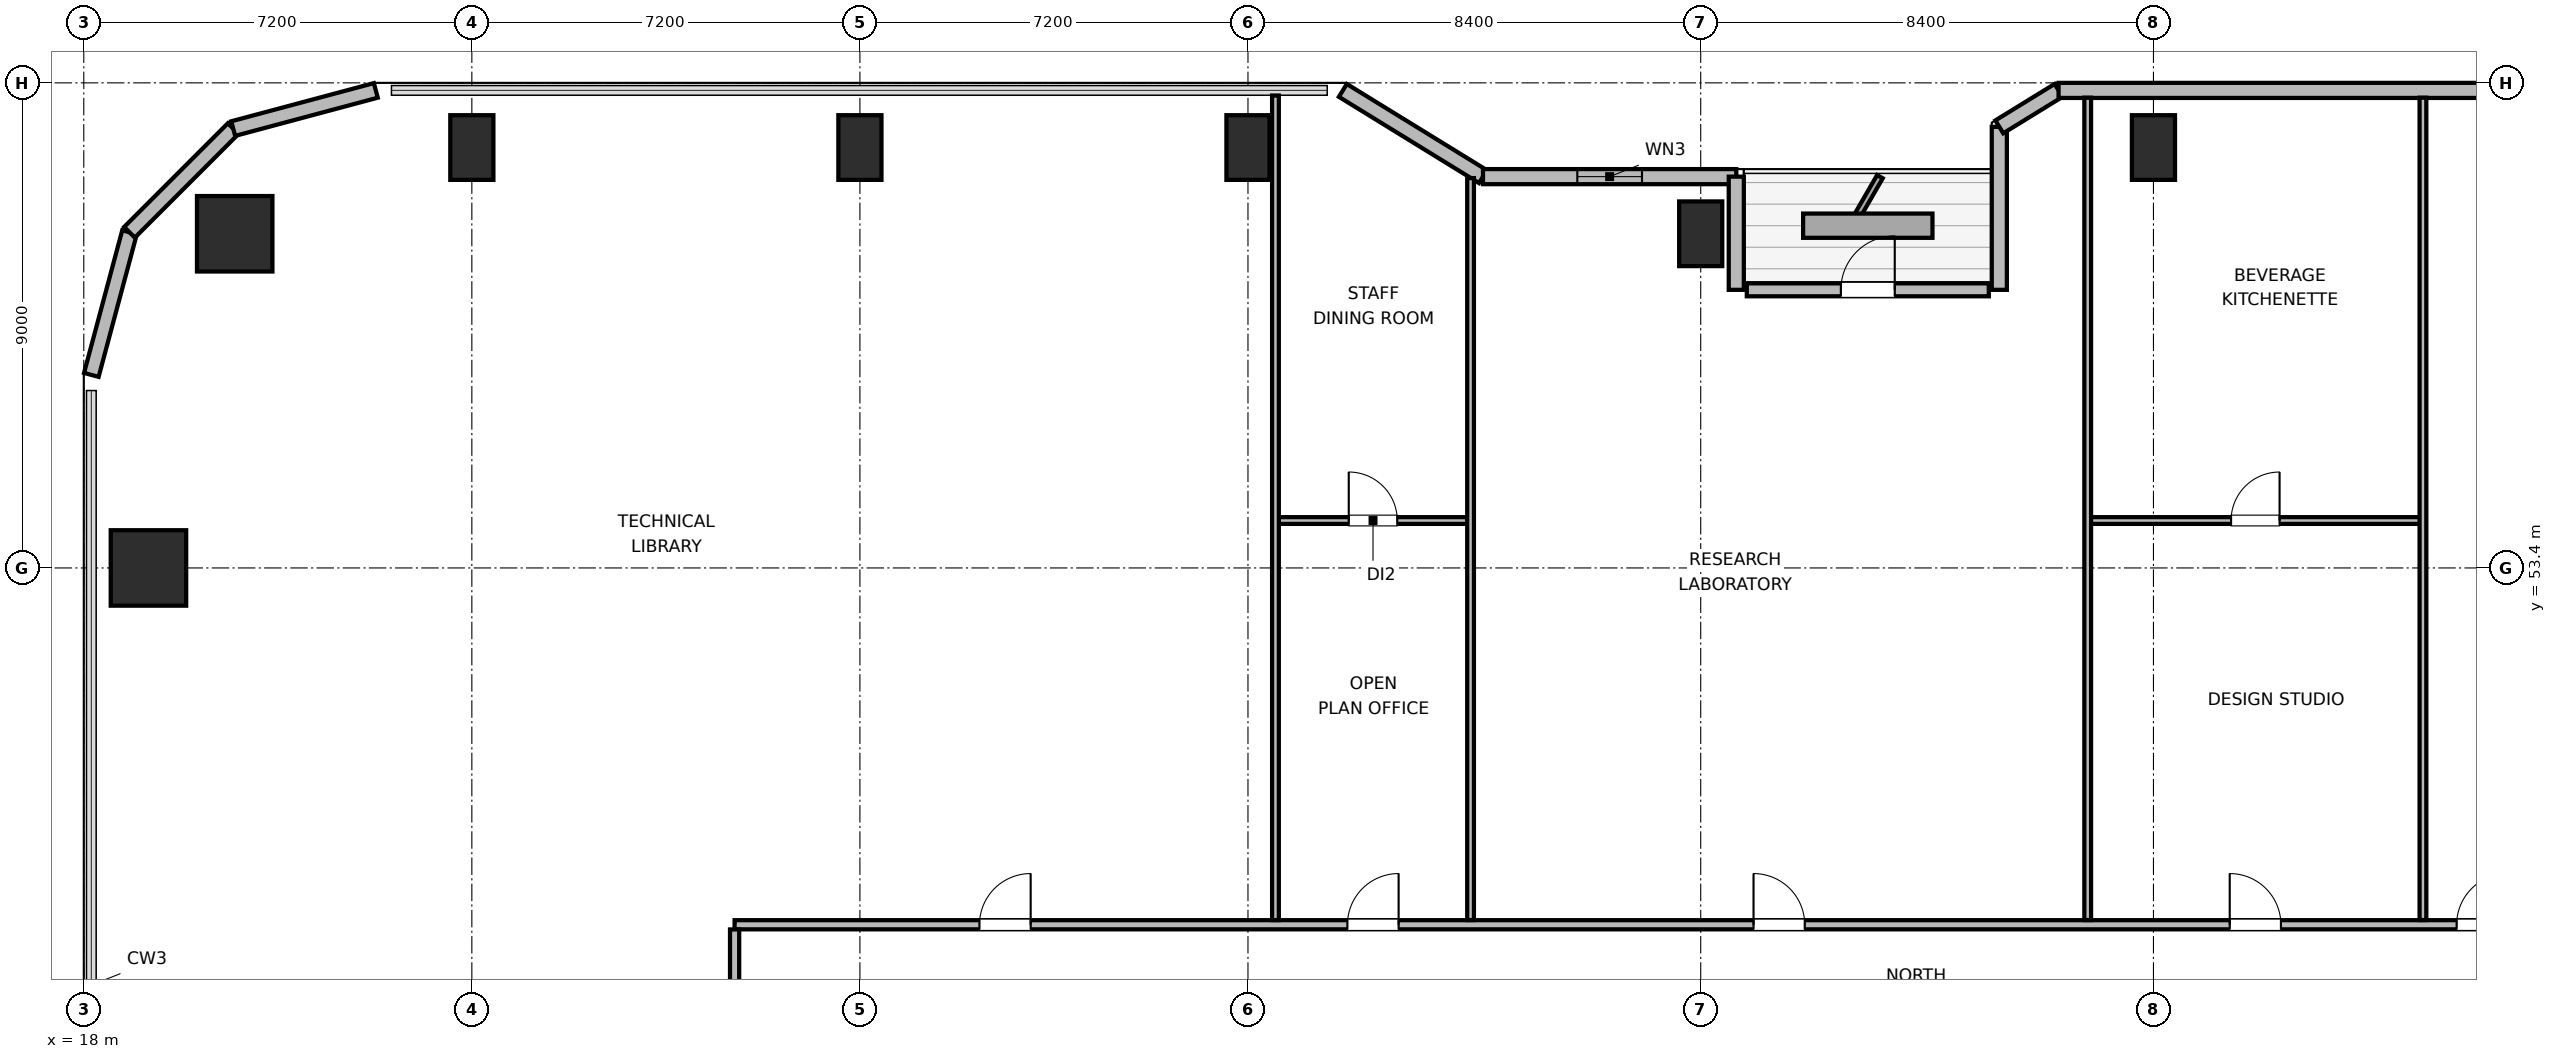
"""IFC4 building model, lengths in metres.
Left out: names, types, materials, properties, quantities, classifications, styles, units other than length and angle.
Written with IfcOpenShell. Run it as: python <this file> out.ifc"""

import sys

from ifc_helpers import new_model, si_unit, direction, frame, frame_2d, origin, origin_2d, place, context, subcontext, project, spatial, rectangle, circle, extrude, element, fill, save


model = new_model("IFC4")
c1 = context("Model", 3, precision=1e-05, world=origin(), true_north=direction((0.0, 1.0)))
c2 = subcontext(c1, "Body", "Model", "MODEL_VIEW")
j1 = project(units=[si_unit("LENGTHUNIT", "METRE"), si_unit("PLANEANGLEUNIT", "RADIAN")], contexts=[c1])
p1 = place(None, origin())
s1 = spatial("IfcSite", under=j1, at=p1, CompositionType="ELEMENT")
p2 = place(p1, origin())
s2 = spatial("IfcBuilding", under=s1, at=p2, CompositionType="ELEMENT")
p3 = place(p2, frame((0.0, 0.0, 158.4)))
s3 = spatial("IfcBuildingStorey", under=s2, at=p3, CompositionType="ELEMENT", Elevation=158.4)
p4 = place(p3, frame((20.8, 59.6, 0.0), z_axis=(0.0, 0.0, 1.0), x_axis=(1.0, 0.0, 0.0)))
e1 = element("IfcColumn", 1, at=p4, inside=s3, PredefinedType="COLUMN", context=c2, shape_type="SweptSolid", body=[
    extrude(circle(Radius=0.7, at=origin_2d()), origin(), (0.0, 0.0, 1.0), 3.9),
])
for number, where, z_axis, x_axis in (
    (2, (25.2, 61.2, 0.0), (0.0, 0.0, 1.0), (1.0, 0.0, 0.0)),
    (3, (32.4, 61.2, 0.0), (0.0, 0.0, 1.0), (1.0, 0.0, 0.0)),
    (4, (39.6, 61.2, 0.0), (0.0, 0.0, 1.0), (1.0, 0.0, 0.0)),
    (5, (48.0, 59.6, 0.0), (0.0, 0.0, 1.0), (1.0, 0.0, 0.0)),
    (6, (56.4, 61.2, 0.0), (0.0, 0.0, 1.0), (1.0, 0.0, 0.0)),
):
    element("IfcColumn", number, at=place(p3, frame(where, z_axis=z_axis, x_axis=x_axis)), inside=s3, PredefinedType="COLUMN", context=c2, shape_type="SweptSolid", body=[
        extrude(rectangle(XDim=0.8, YDim=1.2, at=origin_2d()), origin(), (0.0, 0.0, 1.0), 3.9),
    ])
p5 = place(p3, frame((19.2, 53.4, 0.0), z_axis=(0.0, 0.0, 1.0), x_axis=(1.0, 0.0, 0.0)))
e7 = element("IfcColumn", 7, at=p5, inside=s3, PredefinedType="COLUMN", context=c2, shape_type="SweptSolid", body=[
    extrude(rectangle(XDim=1.4, YDim=1.4, at=origin_2d()), origin(), (0.0, 0.0, 1.0), 3.9),
])
p6 = place(p3, frame((18.14, 56.982, 0.0), z_axis=(0.0, 0.0, 1.0), x_axis=(0.258672222976, 0.9659651552, 0.0)))
e8 = element("IfcWall", 8, at=p6, inside=s3, PredefinedType="SOLIDWALL", context=c2, shape_type="SweptSolid", body=[
    extrude(rectangle(XDim=2.739, YDim=0.28, at=frame_2d((1.37, 0.0))), origin(), (0.0, 0.0, 1.0), 3.68),
])
p7 = place(p3, frame((18.848, 59.627, 0.0), z_axis=(0.0, 0.0, 1.0), x_axis=(0.707106781187, 0.707106781187, 0.0)))
e9 = element("IfcWall", 9, at=p7, inside=s3, PredefinedType="SOLIDWALL", context=c2, shape_type="SweptSolid", body=[
    extrude(rectangle(XDim=2.721, YDim=0.28, at=frame_2d((1.36, 0.0))), origin(), (0.0, 0.0, 1.0), 3.68),
])
p8 = place(p3, frame((20.772, 61.552, 0.0), z_axis=(0.0, 0.0, 1.0), x_axis=(0.965971118627, 0.258649952598, 0.0)))
e10 = element("IfcWall", 10, at=p8, inside=s3, PredefinedType="SOLIDWALL", context=c2, shape_type="SweptSolid", body=[
    extrude(rectangle(XDim=2.739, YDim=0.28, at=frame_2d((1.37, 0.0))), origin(), (0.0, 0.0, 1.0), 3.68),
])
p9 = place(p3, frame((41.36, 62.26, 0.0), z_axis=(0.0, 0.0, 1.0), x_axis=(0.851652825334, -0.524106349037, 0.0)))
e11 = element("IfcWall", 11, at=p9, inside=s3, PredefinedType="SOLIDWALL", context=c2, shape_type="SweptSolid", body=[
    extrude(rectangle(XDim=3.053, YDim=0.28, at=frame_2d((1.526, 0.0))), origin(), (0.0, 0.0, 1.0), 2.265),
])
p10 = place(p3, frame((43.96, 60.66, 0.0), z_axis=(0.0, 0.0, 1.0), x_axis=(1.0, 0.0, 0.0)))
e12 = element("IfcWall", 12, at=p10, inside=s3, PredefinedType="SOLIDWALL", context=c2, shape_type="SweptSolid", body=[
    extrude(rectangle(XDim=4.699, YDim=0.28, at=frame_2d((2.35, 0.0))), origin(), (0.0, 0.0, 1.0), 2.265),
])
p11 = place(p10, frame((1.75, 0.0, 0.85)))
e13 = element("IfcOpeningElement", 13, at=p11, cuts=e12, PredefinedType="OPENING", context=c2, shape_type="SweptSolid", body=[
    extrude(rectangle(XDim=1.2, YDim=1.1, at=frame_2d((0.6, 0.55))), frame((0.0, 0.15, 0.0), z_axis=(0.0, -1.0, 0.0), x_axis=(1.0, 0.0, 0.0)), (0.0, 0.0, 1.0), 0.3),
])
p12 = place(p3, frame((48.66, 60.66, 0.0), z_axis=(0.0, 0.0, 1.0), x_axis=(0.0, -1.0, 0.0)))
e14 = element("IfcWall", 14, at=p12, inside=s3, PredefinedType="SOLIDWALL", context=c2, shape_type="SweptSolid", body=[
    extrude(rectangle(XDim=2.1, YDim=0.28, at=frame_2d((1.05, 0.0))), origin(), (0.0, 0.0, 1.0), 2.265),
])
p13 = place(p3, frame((48.855, 58.56, 0.0), z_axis=(0.0, 0.0, 1.0), x_axis=(1.0, 0.0, 0.0)))
e15 = element("IfcWall", 15, at=p13, inside=s3, PredefinedType="SOLIDWALL", context=c2, shape_type="SweptSolid", body=[
    extrude(rectangle(XDim=4.49, YDim=0.24, at=frame_2d((2.245, 0.0))), origin(), (0.0, 0.0, 1.0), 3.68),
])
p14 = place(p13, frame((1.745, 0.0, 0.0)))
e16 = element("IfcOpeningElement", 16, at=p14, cuts=e15, PredefinedType="OPENING", context=c2, shape_type="SweptSolid", body=[
    extrude(rectangle(XDim=1.0, YDim=2.02, at=frame_2d((0.5, 1.01))), frame((0.0, 0.13, 0.0), z_axis=(0.0, -1.0, 0.0), x_axis=(1.0, 0.0, 0.0)), (0.0, 0.0, 1.0), 0.26),
])
p15 = place(p3, frame((53.54, 58.56, 0.0), z_axis=(0.0, 0.0, 1.0), x_axis=(0.0, 1.0, 0.0)))
e17 = element("IfcWall", 17, at=p15, inside=s3, PredefinedType="SOLIDWALL", context=c2, shape_type="SweptSolid", body=[
    extrude(rectangle(XDim=3.024, YDim=0.28, at=frame_2d((1.512, 0.0))), origin(), (0.0, 0.0, 1.0), 2.265),
])
p16 = place(p3, frame((53.54, 61.584, 0.0), z_axis=(0.0, 0.0, 1.0), x_axis=(0.851801140441, 0.523865266212, 0.0)))
e18 = element("IfcWall", 18, at=p16, inside=s3, PredefinedType="SOLIDWALL", context=c2, shape_type="SweptSolid", body=[
    extrude(rectangle(XDim=1.291, YDim=0.28, at=frame_2d((0.646, 0.0))), origin(), (0.0, 0.0, 1.0), 3.68),
])
p17 = place(p3, frame((54.64, 62.26, 0.0), z_axis=(0.0, 0.0, 1.0), x_axis=(1.0, 0.0, 0.0)))
e19 = element("IfcWall", 19, at=p17, inside=s3, PredefinedType="SOLIDWALL", context=c2, shape_type="SweptSolid", body=[
    extrude(rectangle(XDim=10.742, YDim=0.28, at=frame_2d((5.371, 0.0))), origin(), (0.0, 0.0, 1.0), 3.68),
])
p18 = place(p3, frame((30.075, 46.78, 0.0), z_axis=(0.0, 0.0, 1.0), x_axis=(1.0, 0.0, 0.0)))
e20 = element("IfcWall", 20, at=p18, inside=s3, PredefinedType="PARTITIONING", context=c2, shape_type="SweptSolid", body=[
    extrude(rectangle(XDim=33.525, YDim=0.17, at=frame_2d((16.763, 0.0))), origin(), (0.0, 0.0, 1.0), 3.68),
])
p19 = place(p18, frame((4.543, 0.0, 0.0)))
e21 = element("IfcOpeningElement", 21, at=p19, cuts=e20, PredefinedType="OPENING", context=c2, shape_type="SweptSolid", body=[
    extrude(rectangle(XDim=0.95, YDim=2.04, at=frame_2d((0.475, 1.02))), frame((0.0, 0.095, 0.0), z_axis=(0.0, -1.0, 0.0), x_axis=(1.0, 0.0, 0.0)), (0.0, 0.0, 1.0), 0.19),
])
p20 = place(p18, frame((11.37, 0.0, 0.0)))
e22 = element("IfcOpeningElement", 22, at=p20, cuts=e20, PredefinedType="OPENING", context=c2, shape_type="SweptSolid", body=[
    extrude(rectangle(XDim=0.95, YDim=2.04, at=frame_2d((0.475, 1.02))), frame((0.0, 0.095, 0.0), z_axis=(0.0, -1.0, 0.0), x_axis=(1.0, 0.0, 0.0)), (0.0, 0.0, 1.0), 0.19),
])
p21 = place(p18, frame((18.905, 0.0, 0.0)))
e23 = element("IfcOpeningElement", 23, at=p21, cuts=e20, PredefinedType="OPENING", context=c2, shape_type="SweptSolid", body=[
    extrude(rectangle(XDim=0.95, YDim=2.04, at=frame_2d((0.475, 1.02))), frame((0.0, 0.095, 0.0), z_axis=(0.0, -1.0, 0.0), x_axis=(1.0, 0.0, 0.0)), (0.0, 0.0, 1.0), 0.19),
])
p22 = place(p18, frame((27.74, 0.0, 0.0)))
e24 = element("IfcOpeningElement", 24, at=p22, cuts=e20, PredefinedType="OPENING", context=c2, shape_type="SweptSolid", body=[
    extrude(rectangle(XDim=0.95, YDim=2.04, at=frame_2d((0.475, 1.02))), frame((0.0, 0.095, 0.0), z_axis=(0.0, -1.0, 0.0), x_axis=(1.0, 0.0, 0.0)), (0.0, 0.0, 1.0), 0.19),
])
p23 = place(p18, frame((31.95, 0.0, 0.0)))
e25 = element("IfcOpeningElement", 25, at=p23, cuts=e20, PredefinedType="OPENING", context=c2, shape_type="SweptSolid", body=[
    extrude(rectangle(XDim=0.95, YDim=2.04, at=frame_2d((0.475, 1.02))), frame((0.0, 0.095, 0.0), z_axis=(0.0, -1.0, 0.0), x_axis=(1.0, 0.0, 0.0)), (0.0, 0.0, 1.0), 0.19),
])
p24 = place(p3, frame((30.075, 37.1, 0.0), z_axis=(0.0, 0.0, 1.0), x_axis=(0.0, 1.0, 0.0)))
e26 = element("IfcWall", 26, at=p24, inside=s3, PredefinedType="PARTITIONING", context=c2, shape_type="SweptSolid", body=[
    extrude(rectangle(XDim=9.593, YDim=0.17, at=frame_2d((4.796, 0.0))), origin(), (0.0, 0.0, 1.0), 3.68),
])
p25 = place(p24, frame((4.365, 0.0, 0.0)))
e27 = element("IfcOpeningElement", 27, at=p25, cuts=e26, PredefinedType="OPENING", context=c2, shape_type="SweptSolid", body=[
    extrude(rectangle(XDim=0.95, YDim=2.04, at=frame_2d((0.475, 1.02))), frame((0.0, 0.095, 0.0), z_axis=(0.0, -1.0, 0.0), x_axis=(1.0, 0.0, 0.0)), (0.0, 0.0, 1.0), 0.19),
])
p26 = place(p3, frame((40.11, 54.28, 0.0), z_axis=(0.0, 0.0, 1.0), x_axis=(1.0, 0.0, 0.0)))
e28 = element("IfcWall", 28, at=p26, inside=s3, PredefinedType="PARTITIONING", context=c2, shape_type="SweptSolid", body=[
    extrude(rectangle(XDim=3.62, YDim=0.125, at=frame_2d((1.81, 0.0))), origin(), (0.0, 0.0, 1.0), 3.68),
])
p27 = place(p26, frame((1.36, 0.0, 0.0)))
e29 = element("IfcOpeningElement", 29, at=p27, cuts=e28, PredefinedType="OPENING", context=c2, shape_type="SweptSolid", body=[
    extrude(rectangle(XDim=0.9, YDim=2.02, at=frame_2d((0.45, 1.01))), frame((0.0, 0.073, 0.0), z_axis=(0.0, -1.0, 0.0), x_axis=(1.0, 0.0, 0.0)), (0.0, 0.0, 1.0), 0.145),
])
p28 = place(p3, frame((40.11, 46.867, 0.0), z_axis=(0.0, 0.0, 1.0), x_axis=(0.0, 1.0, 0.0)))
e30 = element("IfcWall", 30, at=p28, inside=s3, PredefinedType="PARTITIONING", context=c2, shape_type="SweptSolid", body=[
    extrude(rectangle(XDim=15.298, YDim=0.125, at=frame_2d((7.649, 0.0))), origin(), (0.0, 0.0, 1.0), 3.043),
])
p29 = place(p3, frame((43.73, 46.867, 0.0), z_axis=(0.0, 0.0, 1.0), x_axis=(0.0, 1.0, 0.0)))
e31 = element("IfcWall", 31, at=p29, inside=s3, PredefinedType="PARTITIONING", context=c2, shape_type="SweptSolid", body=[
    extrude(rectangle(XDim=13.766, YDim=0.125, at=frame_2d((6.883, 0.0))), origin(), (0.0, 0.0, 1.0), 3.043),
])
p30 = place(p3, frame((55.18, 54.28, 0.0), z_axis=(0.0, 0.0, 1.0), x_axis=(1.0, 0.0, 0.0)))
e32 = element("IfcWall", 32, at=p30, inside=s3, PredefinedType="PARTITIONING", context=c2, shape_type="SweptSolid", body=[
    extrude(rectangle(XDim=6.22, YDim=0.125, at=frame_2d((3.11, 0.0))), origin(), (0.0, 0.0, 1.0), 3.68),
])
p31 = place(p30, frame((2.66, 0.0, 0.0)))
e33 = element("IfcOpeningElement", 33, at=p31, cuts=e32, PredefinedType="OPENING", context=c2, shape_type="SweptSolid", body=[
    extrude(rectangle(XDim=0.9, YDim=2.02, at=frame_2d((0.45, 1.01))), frame((0.0, 0.073, 0.0), z_axis=(0.0, -1.0, 0.0), x_axis=(1.0, 0.0, 0.0)), (0.0, 0.0, 1.0), 0.145),
])
p32 = place(p3, frame((55.18, 46.867, 0.0), z_axis=(0.0, 0.0, 1.0), x_axis=(0.0, 1.0, 0.0)))
e34 = element("IfcWall", 34, at=p32, inside=s3, PredefinedType="PARTITIONING", context=c2, shape_type="SweptSolid", body=[
    extrude(rectangle(XDim=15.258, YDim=0.125, at=frame_2d((7.629, 0.0))), origin(), (0.0, 0.0, 1.0), 3.043),
])
p33 = place(p3, frame((61.4, 46.867, 0.0), z_axis=(0.0, 0.0, 1.0), x_axis=(0.0, 1.0, 0.0)))
e35 = element("IfcWall", 35, at=p33, inside=s3, PredefinedType="PARTITIONING", context=c2, shape_type="SweptSolid", body=[
    extrude(rectangle(XDim=15.258, YDim=0.125, at=frame_2d((7.629, 0.0))), origin(), (0.0, 0.0, 1.0), 3.68),
])
p34 = place(p11, origin())
e36 = element("IfcWindow", 36, at=p34, inside=s3, PartitioningType="SINGLE_PANEL", PredefinedType="WINDOW", context=c2, shape_type="SweptSolid", body=[
    extrude(rectangle(XDim=1.2, YDim=1.1, at=frame_2d((0.6, 0.55))), frame((0.0, 0.03, 0.0), z_axis=(0.0, -1.0, 0.0), x_axis=(1.0, 0.0, 0.0)), (0.0, 0.0, 1.0), 0.06),
])
fill(e13, e36)
p35 = place(p14, origin())
e37 = element("IfcDoor", 37, at=p35, inside=s3, OperationType="SINGLE_SWING_RIGHT", PredefinedType="DOOR", context=c2, shape_type="SweptSolid", body=[
    extrude(rectangle(XDim=1.0, YDim=2.02, at=frame_2d((0.5, 1.01))), frame((0.0, 0.025, 0.0), z_axis=(0.0, -1.0, 0.0), x_axis=(1.0, 0.0, 0.0)), (0.0, 0.0, 1.0), 0.05),
])
fill(e16, e37)
p36 = place(p19, origin())
e38 = element("IfcDoor", 38, at=p36, inside=s3, OperationType="SINGLE_SWING_RIGHT", PredefinedType="DOOR", context=c2, shape_type="SweptSolid", body=[
    extrude(rectangle(XDim=0.95, YDim=2.04, at=frame_2d((0.475, 1.02))), frame((0.0, 0.025, 0.0), z_axis=(0.0, -1.0, 0.0), x_axis=(1.0, 0.0, 0.0)), (0.0, 0.0, 1.0), 0.05),
])
fill(e21, e38)
p37 = place(p27, origin())
e39 = element("IfcDoor", 39, at=p37, inside=s3, OperationType="SINGLE_SWING_LEFT", PredefinedType="DOOR", context=c2, shape_type="SweptSolid", body=[
    extrude(rectangle(XDim=0.9, YDim=2.02, at=frame_2d((0.45, 1.01))), frame((0.0, 0.025, 0.0), z_axis=(0.0, -1.0, 0.0), x_axis=(1.0, 0.0, 0.0)), (0.0, 0.0, 1.0), 0.05),
])
fill(e29, e39)
p38 = place(p20, origin())
e40 = element("IfcDoor", 40, at=p38, inside=s3, OperationType="SINGLE_SWING_RIGHT", PredefinedType="DOOR", context=c2, shape_type="SweptSolid", body=[
    extrude(rectangle(XDim=0.95, YDim=2.04, at=frame_2d((0.475, 1.02))), frame((0.0, 0.025, 0.0), z_axis=(0.0, -1.0, 0.0), x_axis=(1.0, 0.0, 0.0)), (0.0, 0.0, 1.0), 0.05),
])
fill(e22, e40)
p39 = place(p21, origin())
e41 = element("IfcDoor", 41, at=p39, inside=s3, OperationType="SINGLE_SWING_LEFT", PredefinedType="DOOR", context=c2, shape_type="SweptSolid", body=[
    extrude(rectangle(XDim=0.95, YDim=2.04, at=frame_2d((0.475, 1.02))), frame((0.0, 0.025, 0.0), z_axis=(0.0, -1.0, 0.0), x_axis=(1.0, 0.0, 0.0)), (0.0, 0.0, 1.0), 0.05),
])
fill(e23, e41)
p40 = place(p31, origin())
e42 = element("IfcDoor", 42, at=p40, inside=s3, OperationType="SINGLE_SWING_RIGHT", PredefinedType="DOOR", context=c2, shape_type="SweptSolid", body=[
    extrude(rectangle(XDim=0.9, YDim=2.02, at=frame_2d((0.45, 1.01))), frame((0.0, 0.025, 0.0), z_axis=(0.0, -1.0, 0.0), x_axis=(1.0, 0.0, 0.0)), (0.0, 0.0, 1.0), 0.05),
])
fill(e33, e42)
p41 = place(p22, origin())
e43 = element("IfcDoor", 43, at=p41, inside=s3, OperationType="SINGLE_SWING_LEFT", PredefinedType="DOOR", context=c2, shape_type="SweptSolid", body=[
    extrude(rectangle(XDim=0.95, YDim=2.04, at=frame_2d((0.475, 1.02))), frame((0.0, 0.025, 0.0), z_axis=(0.0, -1.0, 0.0), x_axis=(1.0, 0.0, 0.0)), (0.0, 0.0, 1.0), 0.05),
])
fill(e24, e43)
p42 = place(p23, origin())
e44 = element("IfcDoor", 44, at=p42, inside=s3, OperationType="SINGLE_SWING_RIGHT", PredefinedType="DOOR", context=c2, shape_type="SweptSolid", body=[
    extrude(rectangle(XDim=0.95, YDim=2.04, at=frame_2d((0.475, 1.02))), frame((0.0, 0.025, 0.0), z_axis=(0.0, -1.0, 0.0), x_axis=(1.0, 0.0, 0.0)), (0.0, 0.0, 1.0), 0.05),
])
fill(e25, e44)
save(model, sys.argv[1])
